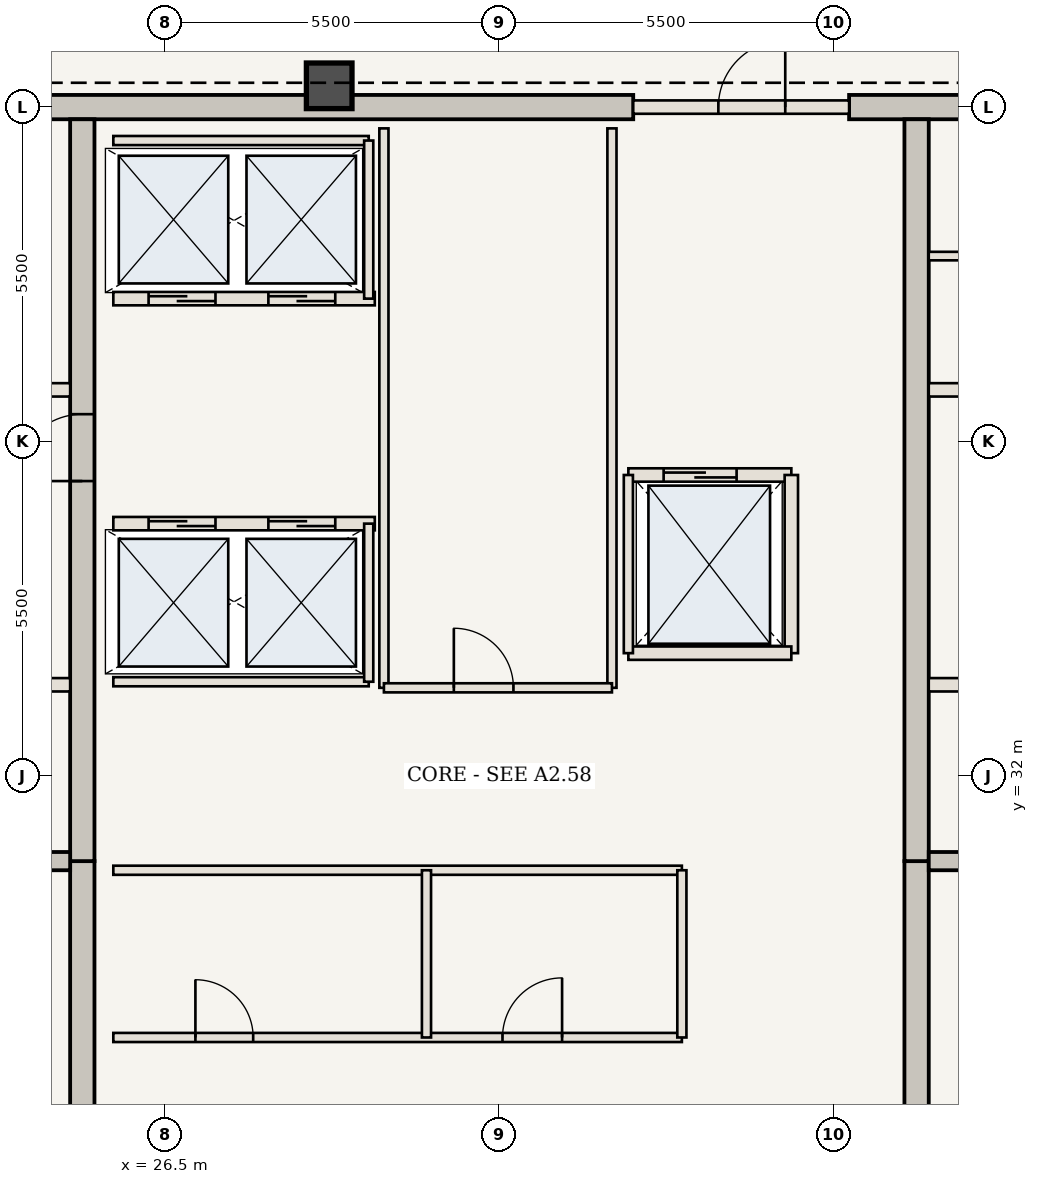
"""IFC4 building model, lengths in metres.
Left out: names, types, materials, properties, quantities, classifications, styles, units other than length and angle.
Written with IfcOpenShell. Run it as: python <this file> out.ifc"""

import sys

from ifc_helpers import new_model, si_unit, direction, frame, frame_2d, origin, origin_2d, place, context, subcontext, project, spatial, rectangle, extrude, element, fill, save


model = new_model("IFC4")
c1 = context("Model", 3, precision=1e-05, world=origin(), true_north=direction((0.0, 1.0)))
c2 = subcontext(c1, "Body", "Model", "MODEL_VIEW")
j1 = project(units=[si_unit("LENGTHUNIT", "METRE"), si_unit("PLANEANGLEUNIT", "RADIAN")], contexts=[c1])
p1 = place(None, origin())
s1 = spatial("IfcSite", under=j1, at=p1, CompositionType="ELEMENT")
p2 = place(p1, origin())
s2 = spatial("IfcBuilding", under=s1, at=p2, CompositionType="ELEMENT")
p3 = place(p2, frame((0.0, 0.0, 262.15)))
s3 = spatial("IfcBuildingStorey", under=s2, at=p3, CompositionType="ELEMENT", Elevation=262.15)
p4 = place(p3, frame((21.41, 43.0, 0.0), z_axis=(0.0, 0.0, 1.0), x_axis=(1.0, 0.0, 0.0)))
e1 = element("IfcWall", 1, at=p4, inside=s3, PredefinedType="SHEAR", context=c2, shape_type="SweptSolid", body=[
    extrude(rectangle(XDim=12.79, YDim=0.4, at=frame_2d((6.395, 0.0))), origin(), (0.0, 0.0, 1.0), 3.85),
])
p5 = place(p3, frame((37.75, 43.0, 0.0), z_axis=(0.0, 0.0, 1.0), x_axis=(1.0, 0.0, 0.0)))
e2 = element("IfcWall", 2, at=p5, inside=s3, PredefinedType="SHEAR", context=c2, shape_type="SweptSolid", body=[
    extrude(rectangle(XDim=4.84, YDim=0.4, at=frame_2d((2.42, 0.0))), origin(), (0.0, 0.0, 1.0), 3.85),
])
p6 = place(p3, frame((25.14, 21.15, 0.0), z_axis=(0.0, 0.0, 1.0), x_axis=(0.0, 1.0, 0.0)))
e3 = element("IfcWall", 3, at=p6, inside=s3, PredefinedType="SHEAR", context=c2, shape_type="SweptSolid", body=[
    extrude(rectangle(XDim=9.45, YDim=0.4, at=frame_2d((4.725, 0.0))), origin(), (0.0, 0.0, 1.0), 3.85),
])
p7 = place(p3, frame((25.14, 30.6, 0.0), z_axis=(0.0, 0.0, 1.0), x_axis=(0.0, 1.0, 0.0)))
e4 = element("IfcWall", 4, at=p7, inside=s3, PredefinedType="SHEAR", context=c2, shape_type="SweptSolid", body=[
    extrude(rectangle(XDim=12.2, YDim=0.4, at=frame_2d((6.1, 0.0))), origin(), (0.0, 0.0, 1.0), 3.85),
])
p8 = place(p7, frame((6.25, 0.0, 0.0)))
e5 = element("IfcOpeningElement", 5, at=p8, cuts=e4, PredefinedType="OPENING", context=c2, shape_type="SweptSolid", body=[
    extrude(rectangle(XDim=1.1, YDim=2.15, at=frame_2d((0.55, 1.075))), frame((0.0, 0.21, 0.0), z_axis=(0.0, -1.0, 0.0), x_axis=(1.0, 0.0, 0.0)), (0.0, 0.0, 1.0), 0.42),
])
p9 = place(p3, frame((38.86, 21.15, 0.0), z_axis=(0.0, 0.0, 1.0), x_axis=(0.0, 1.0, 0.0)))
e6 = element("IfcWall", 6, at=p9, inside=s3, PredefinedType="SHEAR", context=c2, shape_type="SweptSolid", body=[
    extrude(rectangle(XDim=9.45, YDim=0.4, at=frame_2d((4.725, 0.0))), origin(), (0.0, 0.0, 1.0), 3.85),
])
p10 = place(p3, frame((38.86, 30.6, 0.0), z_axis=(0.0, 0.0, 1.0), x_axis=(0.0, 1.0, 0.0)))
e7 = element("IfcWall", 7, at=p10, inside=s3, PredefinedType="SHEAR", context=c2, shape_type="SweptSolid", body=[
    extrude(rectangle(XDim=12.2, YDim=0.4, at=frame_2d((6.1, 0.0))), origin(), (0.0, 0.0, 1.0), 3.85),
])
p11 = place(p3, frame((29.2, 43.35, 0.0), z_axis=(0.0, 0.0, 1.0), x_axis=(1.0, 0.0, 0.0)))
e8 = element("IfcColumn", 8, at=p11, inside=s3, PredefinedType="COLUMN", context=c2, shape_type="SweptSolid", body=[
    extrude(rectangle(XDim=0.75, YDim=0.75, at=origin_2d()), origin(), (0.0, 0.0, 1.0), 3.85),
])
for number, where, z_axis, x_axis in (
    (9, (21.41, 30.6, 0.0), (0.0, 0.0, 1.0), (1.0, 0.0, 0.0)),
    (10, (39.06, 30.6, 0.0), (0.0, 0.0, 1.0), (1.0, 0.0, 0.0)),
):
    element("IfcWall", number, at=place(p3, frame(where, z_axis=z_axis, x_axis=x_axis)), inside=s3, PredefinedType="SHEAR", context=c2, shape_type="SweptSolid", body=[
        extrude(rectangle(XDim=3.53, YDim=0.3, at=frame_2d((1.765, 0.0))), origin(), (0.0, 0.0, 1.0), 3.43),
    ])
p12 = place(p3, frame((21.41, 33.5, 0.0), z_axis=(0.0, 0.0, 1.0), x_axis=(1.0, 0.0, 0.0)))
e11 = element("IfcWall", 11, at=p12, inside=s3, PredefinedType="STANDARD", context=c2, shape_type="SweptSolid", body=[
    extrude(rectangle(XDim=3.53, YDim=0.22, at=frame_2d((1.765, 0.0))), origin(), (0.0, 0.0, 1.0), 3.43),
])
p13 = place(p12, frame((0.75, 0.0, 0.0)))
e12 = element("IfcOpeningElement", 12, at=p13, cuts=e11, PredefinedType="OPENING", context=c2, shape_type="SweptSolid", body=[
    extrude(rectangle(XDim=1.2, YDim=2.2, at=frame_2d((0.6, 1.1))), frame((0.0, 0.12, 0.0), z_axis=(0.0, -1.0, 0.0), x_axis=(1.0, 0.0, 0.0)), (0.0, 0.0, 1.0), 0.24),
])
p14 = place(p3, frame((39.06, 33.5, 0.0), z_axis=(0.0, 0.0, 1.0), x_axis=(1.0, 0.0, 0.0)))
e13 = element("IfcWall", 13, at=p14, inside=s3, PredefinedType="STANDARD", context=c2, shape_type="SweptSolid", body=[
    extrude(rectangle(XDim=3.53, YDim=0.22, at=frame_2d((1.765, 0.0))), origin(), (0.0, 0.0, 1.0), 3.43),
])
p15 = place(p14, frame((1.55, 0.0, 0.0)))
e14 = element("IfcOpeningElement", 14, at=p15, cuts=e13, PredefinedType="OPENING", context=c2, shape_type="SweptSolid", body=[
    extrude(rectangle(XDim=1.2, YDim=2.2, at=frame_2d((0.6, 1.1))), frame((0.0, 0.12, 0.0), z_axis=(0.0, -1.0, 0.0), x_axis=(1.0, 0.0, 0.0)), (0.0, 0.0, 1.0), 0.24),
])
for number, where, z_axis, x_axis in (
    (15, (21.41, 38.35, 0.0), (0.0, 0.0, 1.0), (1.0, 0.0, 0.0)),
    (16, (39.06, 38.35, 0.0), (0.0, 0.0, 1.0), (1.0, 0.0, 0.0)),
):
    element("IfcWall", number, at=place(p3, frame(where, z_axis=z_axis, x_axis=x_axis)), inside=s3, PredefinedType="STANDARD", context=c2, shape_type="SweptSolid", body=[
        extrude(rectangle(XDim=3.53, YDim=0.22, at=frame_2d((1.765, 0.0))), origin(), (0.0, 0.0, 1.0), 3.43),
    ])
p16 = place(p3, frame((39.06, 40.55, 0.0), z_axis=(0.0, 0.0, 1.0), x_axis=(1.0, 0.0, 0.0)))
e17 = element("IfcWall", 17, at=p16, inside=s3, PredefinedType="STANDARD", context=c2, shape_type="SweptSolid", body=[
    extrude(rectangle(XDim=3.53, YDim=0.14, at=frame_2d((1.765, 0.0))), origin(), (0.0, 0.0, 1.0), 3.43),
])
p17 = place(p3, frame((25.65, 27.7, 0.0), z_axis=(0.0, 0.0, 1.0), x_axis=(1.0, 0.0, 0.0)))
e18 = element("IfcWall", 18, at=p17, inside=s3, PredefinedType="STANDARD", context=c2, shape_type="SweptSolid", body=[
    extrude(rectangle(XDim=9.35, YDim=0.15, at=frame_2d((4.675, 0.0))), origin(), (0.0, 0.0, 1.0), 3.43),
])
p18 = place(p17, frame((1.35, 0.0, 0.0)))
e19 = element("IfcOpeningElement", 19, at=p18, cuts=e18, PredefinedType="OPENING", context=c2, shape_type="SweptSolid", body=[
    extrude(rectangle(XDim=0.95, YDim=2.15, at=frame_2d((0.475, 1.075))), frame((0.0, 0.085, 0.0), z_axis=(0.0, -1.0, 0.0), x_axis=(1.0, 0.0, 0.0)), (0.0, 0.0, 1.0), 0.17),
])
p19 = place(p17, frame((6.4, 0.0, 0.0)))
e20 = element("IfcOpeningElement", 20, at=p19, cuts=e18, PredefinedType="OPENING", context=c2, shape_type="SweptSolid", body=[
    extrude(rectangle(XDim=0.98, YDim=2.2, at=frame_2d((0.49, 1.1))), frame((0.0, 0.085, 0.0), z_axis=(0.0, -1.0, 0.0), x_axis=(1.0, 0.0, 0.0)), (0.0, 0.0, 1.0), 0.17),
])
p20 = place(p3, frame((25.65, 30.45, 0.0), z_axis=(0.0, 0.0, 1.0), x_axis=(1.0, 0.0, 0.0)))
e21 = element("IfcWall", 21, at=p20, inside=s3, PredefinedType="STANDARD", context=c2, shape_type="SweptSolid", body=[
    extrude(rectangle(XDim=9.35, YDim=0.15, at=frame_2d((4.675, 0.0))), origin(), (0.0, 0.0, 1.0), 3.43),
])
for number, where, z_axis, x_axis in (
    (22, (30.8, 27.7, 0.0), (0.0, 0.0, 1.0), (0.0, 1.0, 0.0)),
    (23, (35.0, 27.7, 0.0), (0.0, 0.0, 1.0), (0.0, 1.0, 0.0)),
):
    element("IfcWall", number, at=place(p3, frame(where, z_axis=z_axis, x_axis=x_axis)), inside=s3, PredefinedType="STANDARD", context=c2, shape_type="SweptSolid", body=[
        extrude(rectangle(XDim=2.75, YDim=0.15, at=frame_2d((1.375, 0.0))), origin(), (0.0, 0.0, 1.0), 3.43),
    ])
p21 = place(p3, frame((25.65, 36.15, 0.0), z_axis=(0.0, 0.0, 1.0), x_axis=(1.0, 0.0, 0.0)))
e24 = element("IfcWall", 24, at=p21, inside=s3, PredefinedType="STANDARD", context=c2, shape_type="SweptSolid", body=[
    extrude(rectangle(XDim=4.3, YDim=0.22, at=frame_2d((2.15, 0.0))), origin(), (0.0, 0.0, 1.0), 3.43),
])
p22 = place(p21, frame((0.58, 0.0, 0.0)))
e25 = element("IfcOpeningElement", 25, at=p22, cuts=e24, PredefinedType="OPENING", context=c2, shape_type="SweptSolid", body=[
    extrude(rectangle(XDim=1.1, YDim=2.15, at=frame_2d((0.55, 1.075))), frame((0.0, 0.12, 0.0), z_axis=(0.0, -1.0, 0.0), x_axis=(1.0, 0.0, 0.0)), (0.0, 0.0, 1.0), 0.24),
])
p23 = place(p21, frame((2.55, 0.0, 0.0)))
e26 = element("IfcOpeningElement", 26, at=p23, cuts=e24, PredefinedType="OPENING", context=c2, shape_type="SweptSolid", body=[
    extrude(rectangle(XDim=1.1, YDim=2.15, at=frame_2d((0.55, 1.075))), frame((0.0, 0.12, 0.0), z_axis=(0.0, -1.0, 0.0), x_axis=(1.0, 0.0, 0.0)), (0.0, 0.0, 1.0), 0.24),
])
p24 = place(p3, frame((25.65, 33.55, 0.0), z_axis=(0.0, 0.0, 1.0), x_axis=(1.0, 0.0, 0.0)))
e27 = element("IfcWall", 27, at=p24, inside=s3, PredefinedType="STANDARD", context=c2, shape_type="SweptSolid", body=[
    extrude(rectangle(XDim=4.2, YDim=0.15, at=frame_2d((2.1, 0.0))), origin(), (0.0, 0.0, 1.0), 3.43),
])
p25 = place(p3, frame((29.85, 33.55, 0.0), z_axis=(0.0, 0.0, 1.0), x_axis=(0.0, 1.0, 0.0)))
e28 = element("IfcWall", 28, at=p25, inside=s3, PredefinedType="STANDARD", context=c2, shape_type="SweptSolid", body=[
    extrude(rectangle(XDim=2.6, YDim=0.15, at=frame_2d((1.3, 0.0))), origin(), (0.0, 0.0, 1.0), 3.43),
])
p26 = place(p3, frame((25.65, 39.85, 0.0), z_axis=(0.0, 0.0, 1.0), x_axis=(1.0, 0.0, 0.0)))
e29 = element("IfcWall", 29, at=p26, inside=s3, PredefinedType="STANDARD", context=c2, shape_type="SweptSolid", body=[
    extrude(rectangle(XDim=4.3, YDim=0.22, at=frame_2d((2.15, 0.0))), origin(), (0.0, 0.0, 1.0), 3.43),
])
p27 = place(p26, frame((0.58, 0.0, 0.0)))
e30 = element("IfcOpeningElement", 30, at=p27, cuts=e29, PredefinedType="OPENING", context=c2, shape_type="SweptSolid", body=[
    extrude(rectangle(XDim=1.1, YDim=2.15, at=frame_2d((0.55, 1.075))), frame((0.0, 0.12, 0.0), z_axis=(0.0, -1.0, 0.0), x_axis=(1.0, 0.0, 0.0)), (0.0, 0.0, 1.0), 0.24),
])
p28 = place(p26, frame((2.55, 0.0, 0.0)))
e31 = element("IfcOpeningElement", 31, at=p28, cuts=e29, PredefinedType="OPENING", context=c2, shape_type="SweptSolid", body=[
    extrude(rectangle(XDim=1.1, YDim=2.15, at=frame_2d((0.55, 1.075))), frame((0.0, 0.12, 0.0), z_axis=(0.0, -1.0, 0.0), x_axis=(1.0, 0.0, 0.0)), (0.0, 0.0, 1.0), 0.24),
])
p29 = place(p3, frame((25.65, 42.45, 0.0), z_axis=(0.0, 0.0, 1.0), x_axis=(1.0, 0.0, 0.0)))
e32 = element("IfcWall", 32, at=p29, inside=s3, PredefinedType="STANDARD", context=c2, shape_type="SweptSolid", body=[
    extrude(rectangle(XDim=4.2, YDim=0.15, at=frame_2d((2.1, 0.0))), origin(), (0.0, 0.0, 1.0), 3.43),
])
p30 = place(p3, frame((29.85, 39.85, 0.0), z_axis=(0.0, 0.0, 1.0), x_axis=(0.0, 1.0, 0.0)))
e33 = element("IfcWall", 33, at=p30, inside=s3, PredefinedType="STANDARD", context=c2, shape_type="SweptSolid", body=[
    extrude(rectangle(XDim=2.6, YDim=0.15, at=frame_2d((1.3, 0.0))), origin(), (0.0, 0.0, 1.0), 3.43),
])
for number, where, z_axis, x_axis in (
    (34, (30.1, 33.45, 0.0), (0.0, 0.0, 1.0), (0.0, 1.0, 0.0)),
    (35, (33.85, 33.45, 0.0), (0.0, 0.0, 1.0), (0.0, 1.0, 0.0)),
):
    element("IfcWall", number, at=place(p3, frame(where, z_axis=z_axis, x_axis=x_axis)), inside=s3, PredefinedType="STANDARD", context=c2, shape_type="SweptSolid", body=[
        extrude(rectangle(XDim=9.2, YDim=0.15, at=frame_2d((4.6, 0.0))), origin(), (0.0, 0.0, 1.0), 3.43),
    ])
p31 = place(p3, frame((30.1, 33.45, 0.0), z_axis=(0.0, 0.0, 1.0), x_axis=(1.0, 0.0, 0.0)))
e36 = element("IfcWall", 36, at=p31, inside=s3, PredefinedType="STANDARD", context=c2, shape_type="SweptSolid", body=[
    extrude(rectangle(XDim=3.75, YDim=0.15, at=frame_2d((1.875, 0.0))), origin(), (0.0, 0.0, 1.0), 3.43),
])
p32 = place(p31, frame((1.15, 0.0, 0.0)))
e37 = element("IfcOpeningElement", 37, at=p32, cuts=e36, PredefinedType="OPENING", context=c2, shape_type="SweptSolid", body=[
    extrude(rectangle(XDim=0.98, YDim=2.2, at=frame_2d((0.49, 1.1))), frame((0.0, 0.085, 0.0), z_axis=(0.0, -1.0, 0.0), x_axis=(1.0, 0.0, 0.0)), (0.0, 0.0, 1.0), 0.17),
])
p33 = place(p3, frame((34.2, 43.0, 0.0), z_axis=(0.0, 0.0, 1.0), x_axis=(1.0, 0.0, 0.0)))
e38 = element("IfcWall", 38, at=p33, inside=s3, PredefinedType="STANDARD", context=c2, shape_type="SweptSolid", body=[
    extrude(rectangle(XDim=3.55, YDim=0.22, at=frame_2d((1.775, 0.0))), origin(), (0.0, 0.0, 1.0), 3.43),
])
p34 = place(p33, frame((1.4, 0.0, 0.0)))
e39 = element("IfcOpeningElement", 39, at=p34, cuts=e38, PredefinedType="OPENING", context=c2, shape_type="SweptSolid", body=[
    extrude(rectangle(XDim=1.1, YDim=2.15, at=frame_2d((0.55, 1.075))), frame((0.0, 0.12, 0.0), z_axis=(0.0, -1.0, 0.0), x_axis=(1.0, 0.0, 0.0)), (0.0, 0.0, 1.0), 0.24),
])
p35 = place(p3, frame((34.12, 36.95, 0.0), z_axis=(0.0, 0.0, 1.0), x_axis=(1.0, 0.0, 0.0)))
e40 = element("IfcWall", 40, at=p35, inside=s3, PredefinedType="STANDARD", context=c2, shape_type="SweptSolid", body=[
    extrude(rectangle(XDim=2.68, YDim=0.22, at=frame_2d((1.34, 0.0))), origin(), (0.0, 0.0, 1.0), 3.43),
])
p36 = place(p35, frame((0.58, 0.0, 0.0)))
e41 = element("IfcOpeningElement", 41, at=p36, cuts=e40, PredefinedType="OPENING", context=c2, shape_type="SweptSolid", body=[
    extrude(rectangle(XDim=1.2, YDim=2.2, at=frame_2d((0.6, 1.1))), frame((0.0, 0.12, 0.0), z_axis=(0.0, -1.0, 0.0), x_axis=(1.0, 0.0, 0.0)), (0.0, 0.0, 1.0), 0.24),
])
p37 = place(p3, frame((36.8, 34.02, 0.0), z_axis=(0.0, 0.0, 1.0), x_axis=(0.0, 1.0, 0.0)))
e42 = element("IfcWall", 42, at=p37, inside=s3, PredefinedType="STANDARD", context=c2, shape_type="SweptSolid", body=[
    extrude(rectangle(XDim=2.93, YDim=0.22, at=frame_2d((1.465, 0.0))), origin(), (0.0, 0.0, 1.0), 3.43),
])
p38 = place(p3, frame((34.12, 34.02, 0.0), z_axis=(0.0, 0.0, 1.0), x_axis=(1.0, 0.0, 0.0)))
e43 = element("IfcWall", 43, at=p38, inside=s3, PredefinedType="STANDARD", context=c2, shape_type="SweptSolid", body=[
    extrude(rectangle(XDim=2.68, YDim=0.22, at=frame_2d((1.34, 0.0))), origin(), (0.0, 0.0, 1.0), 3.43),
])
p39 = place(p3, frame((34.12, 34.02, 0.0), z_axis=(0.0, 0.0, 1.0), x_axis=(0.0, 1.0, 0.0)))
e44 = element("IfcWall", 44, at=p39, inside=s3, PredefinedType="STANDARD", context=c2, shape_type="SweptSolid", body=[
    extrude(rectangle(XDim=2.93, YDim=0.15, at=frame_2d((1.465, 0.0))), origin(), (0.0, 0.0, 1.0), 3.43),
])
p40 = place(p8, origin())
e45 = element("IfcDoor", 45, at=p40, inside=s3, OperationType="SINGLE_SWING_LEFT", PredefinedType="DOOR", context=c2, shape_type="SweptSolid", body=[
    extrude(rectangle(XDim=1.1, YDim=2.15, at=frame_2d((0.55, 1.075))), frame((0.0, 0.025, 0.0), z_axis=(0.0, -1.0, 0.0), x_axis=(1.0, 0.0, 0.0)), (0.0, 0.0, 1.0), 0.05),
])
fill(e5, e45)
p41 = place(p18, origin())
e46 = element("IfcDoor", 46, at=p41, inside=s3, OperationType="SINGLE_SWING_LEFT", PredefinedType="DOOR", context=c2, shape_type="SweptSolid", body=[
    extrude(rectangle(XDim=0.95, YDim=2.15, at=frame_2d((0.475, 1.075))), frame((0.0, 0.025, 0.0), z_axis=(0.0, -1.0, 0.0), x_axis=(1.0, 0.0, 0.0)), (0.0, 0.0, 1.0), 0.05),
])
fill(e19, e46)
p42 = place(p19, origin())
e47 = element("IfcDoor", 47, at=p42, inside=s3, OperationType="SINGLE_SWING_RIGHT", PredefinedType="DOOR", context=c2, shape_type="SweptSolid", body=[
    extrude(rectangle(XDim=0.98, YDim=2.2, at=frame_2d((0.49, 1.1))), frame((0.0, 0.025, 0.0), z_axis=(0.0, -1.0, 0.0), x_axis=(1.0, 0.0, 0.0)), (0.0, 0.0, 1.0), 0.05),
])
fill(e20, e47)
p43 = place(p22, origin())
e48 = element("IfcDoor", 48, at=p43, inside=s3, OperationType="DOUBLE_DOOR_SLIDING", PredefinedType="DOOR", context=c2, shape_type="SweptSolid", body=[
    extrude(rectangle(XDim=1.1, YDim=2.15, at=frame_2d((0.55, 1.075))), frame((0.0, 0.025, 0.0), z_axis=(0.0, -1.0, 0.0), x_axis=(1.0, 0.0, 0.0)), (0.0, 0.0, 1.0), 0.05),
])
fill(e25, e48)
p44 = place(p23, origin())
e49 = element("IfcDoor", 49, at=p44, inside=s3, OperationType="DOUBLE_DOOR_SLIDING", PredefinedType="DOOR", context=c2, shape_type="SweptSolid", body=[
    extrude(rectangle(XDim=1.1, YDim=2.15, at=frame_2d((0.55, 1.075))), frame((0.0, 0.025, 0.0), z_axis=(0.0, -1.0, 0.0), x_axis=(1.0, 0.0, 0.0)), (0.0, 0.0, 1.0), 0.05),
])
fill(e26, e49)
p45 = place(p27, origin())
e50 = element("IfcDoor", 50, at=p45, inside=s3, OperationType="DOUBLE_DOOR_SLIDING", PredefinedType="DOOR", context=c2, shape_type="SweptSolid", body=[
    extrude(rectangle(XDim=1.1, YDim=2.15, at=frame_2d((0.55, 1.075))), frame((0.0, 0.025, 0.0), z_axis=(0.0, -1.0, 0.0), x_axis=(1.0, 0.0, 0.0)), (0.0, 0.0, 1.0), 0.05),
])
fill(e30, e50)
p46 = place(p28, origin())
e51 = element("IfcDoor", 51, at=p46, inside=s3, OperationType="DOUBLE_DOOR_SLIDING", PredefinedType="DOOR", context=c2, shape_type="SweptSolid", body=[
    extrude(rectangle(XDim=1.1, YDim=2.15, at=frame_2d((0.55, 1.075))), frame((0.0, 0.025, 0.0), z_axis=(0.0, -1.0, 0.0), x_axis=(1.0, 0.0, 0.0)), (0.0, 0.0, 1.0), 0.05),
])
fill(e31, e51)
p47 = place(p32, origin())
e52 = element("IfcDoor", 52, at=p47, inside=s3, OperationType="SINGLE_SWING_LEFT", PredefinedType="DOOR", context=c2, shape_type="SweptSolid", body=[
    extrude(rectangle(XDim=0.98, YDim=2.2, at=frame_2d((0.49, 1.1))), frame((0.0, 0.025, 0.0), z_axis=(0.0, -1.0, 0.0), x_axis=(1.0, 0.0, 0.0)), (0.0, 0.0, 1.0), 0.05),
])
fill(e37, e52)
p48 = place(p34, origin())
e53 = element("IfcDoor", 53, at=p48, inside=s3, OperationType="SINGLE_SWING_RIGHT", PredefinedType="DOOR", context=c2, shape_type="SweptSolid", body=[
    extrude(rectangle(XDim=1.1, YDim=2.15, at=frame_2d((0.55, 1.075))), frame((0.0, 0.025, 0.0), z_axis=(0.0, -1.0, 0.0), x_axis=(1.0, 0.0, 0.0)), (0.0, 0.0, 1.0), 0.05),
])
fill(e39, e53)
p49 = place(p36, origin())
e54 = element("IfcDoor", 54, at=p49, inside=s3, OperationType="DOUBLE_DOOR_SLIDING", PredefinedType="DOOR", context=c2, shape_type="SweptSolid", body=[
    extrude(rectangle(XDim=1.2, YDim=2.2, at=frame_2d((0.6, 1.1))), frame((0.0, 0.025, 0.0), z_axis=(0.0, -1.0, 0.0), x_axis=(1.0, 0.0, 0.0)), (0.0, 0.0, 1.0), 0.05),
])
fill(e41, e54)
save(model, sys.argv[1])
